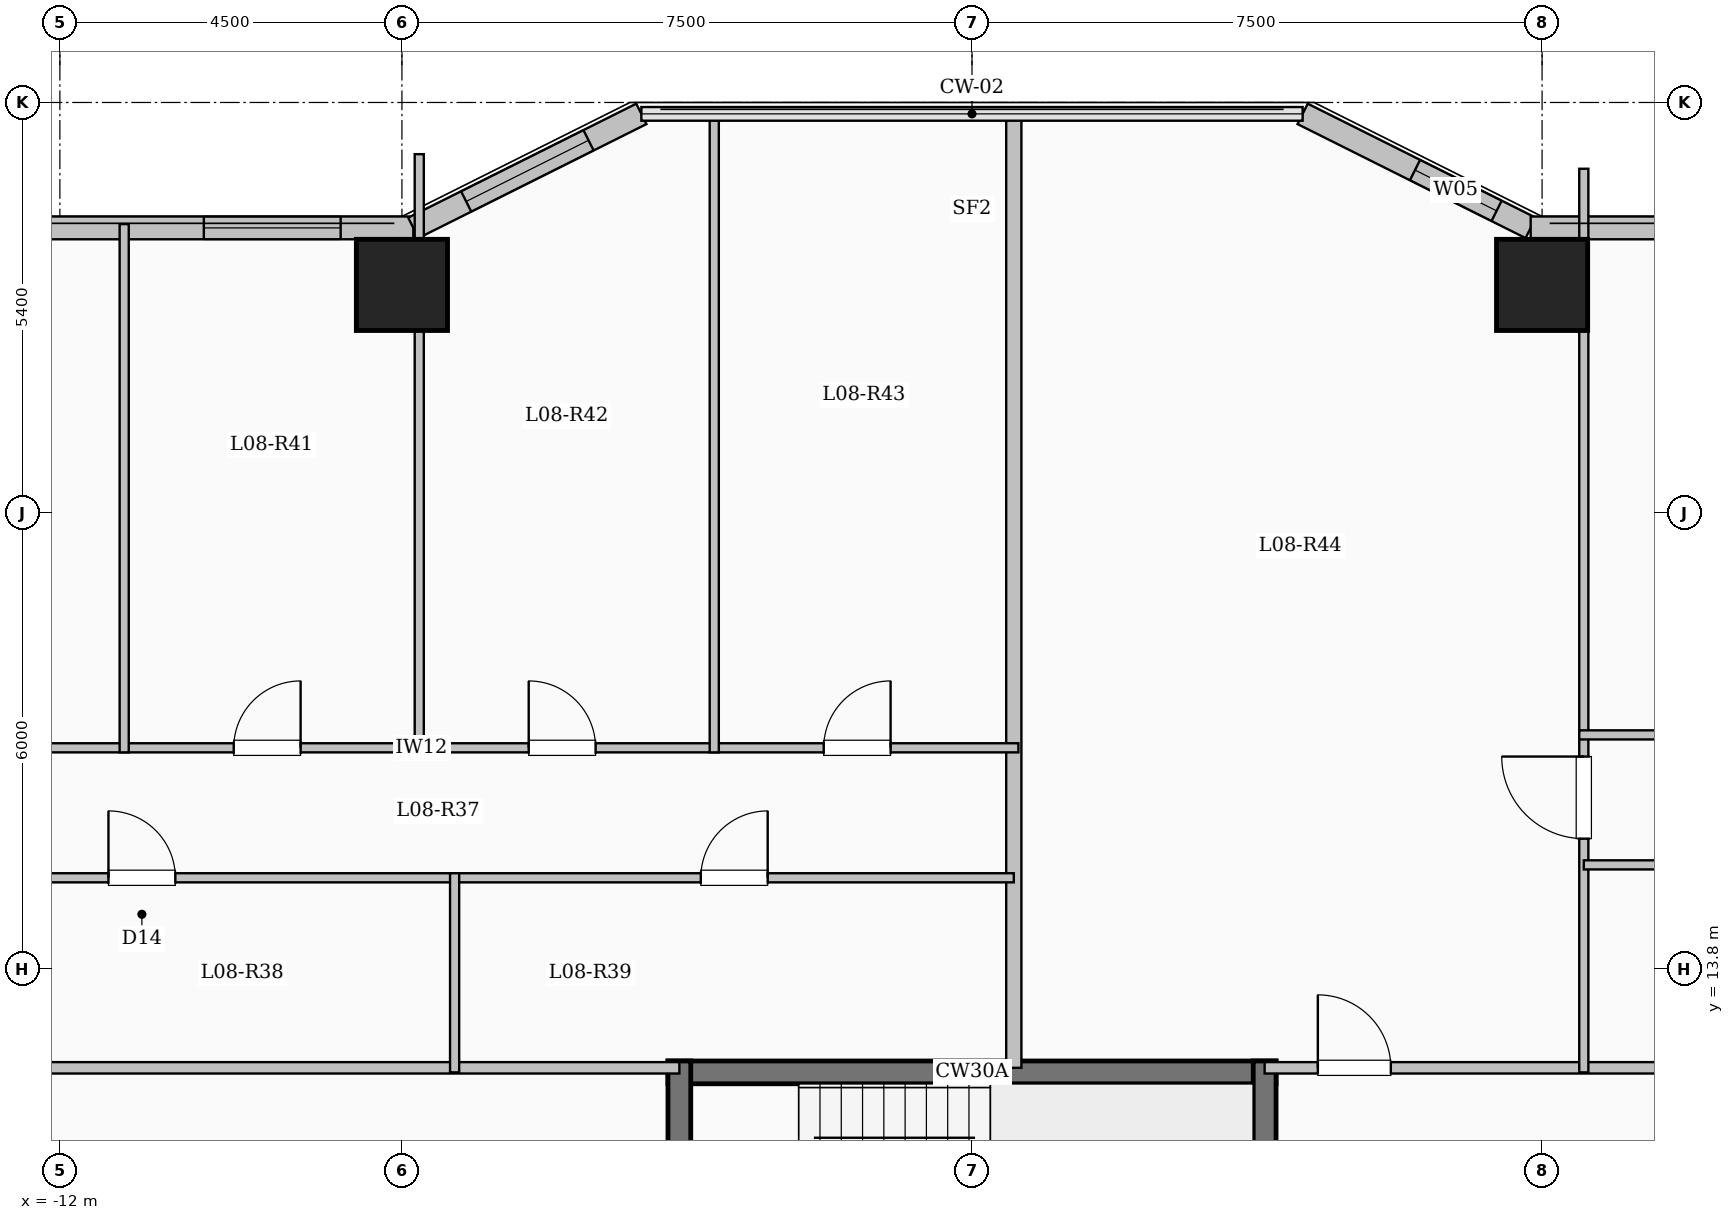
"""IFC4 building model, lengths in metres.
Left out: names, types, materials, properties, quantities, classifications, styles, units other than length and angle.
Written with IfcOpenShell. Run it as: python <this file> out.ifc"""

import sys

from ifc_helpers import new_model, si_unit, direction, frame, frame_2d, origin, origin_2d, place, context, subcontext, project, spatial, rectangle, extrude, element, fill, save


model = new_model("IFC4")
c1 = context("Model", 3, precision=1e-05, world=origin(), true_north=direction((0.0, 1.0)))
c2 = subcontext(c1, "Body", "Model", "MODEL_VIEW")
j1 = project(units=[si_unit("LENGTHUNIT", "METRE"), si_unit("PLANEANGLEUNIT", "RADIAN")], contexts=[c1])
p1 = place(None, origin())
s1 = spatial("IfcSite", under=j1, at=p1, CompositionType="ELEMENT")
p2 = place(p1, origin())
s2 = spatial("IfcBuilding", under=s1, at=p2, CompositionType="ELEMENT")
p3 = place(p2, frame((0.0, 0.0, 34.05)))
s3 = spatial("IfcBuildingStorey", under=s2, at=p3, CompositionType="ELEMENT", Elevation=34.05)
for number, where, z_axis, x_axis in (
    (1, (-7.5, 22.8, 0.0), (0.0, 0.0, 1.0), (1.0, 0.0, 0.0)),
    (2, (7.5, 22.8, 0.0), (0.0, 0.0, 1.0), (1.0, 0.0, 0.0)),
):
    element("IfcColumn", number, at=place(p3, frame(where, z_axis=z_axis, x_axis=x_axis)), inside=s3, PredefinedType="COLUMN", context=c2, shape_type="SweptSolid", body=[
        extrude(rectangle(XDim=1.2, YDim=1.2, at=origin_2d()), origin(), (0.0, 0.0, 1.0), 3.35),
    ])
p4 = place(p3, frame((-22.65, 23.55, 0.0), z_axis=(0.0, 0.0, 1.0), x_axis=(1.0, 0.0, 0.0)))
e3 = element("IfcWall", 3, at=p4, inside=s3, PredefinedType="SOLIDWALL", context=c2, shape_type="SweptSolid", body=[
    extrude(rectangle(XDim=15.3, YDim=0.3, at=frame_2d((7.65, 0.0))), origin(), (0.0, 0.0, 1.0), 3.1),
])
p5 = place(p4, frame((2.637, 0.0, 0.9)))
e4 = element("IfcOpeningElement", 4, at=p5, cuts=e3, PredefinedType="OPENING", context=c2, shape_type="SweptSolid", body=[
    extrude(rectangle(XDim=2.4, YDim=1.8, at=frame_2d((1.2, 0.9))), frame((0.0, 0.16, 0.0), z_axis=(0.0, -1.0, 0.0), x_axis=(1.0, 0.0, 0.0)), (0.0, 0.0, 1.0), 0.32),
])
p6 = place(p4, frame((8.656, 0.0, 0.9)))
e5 = element("IfcOpeningElement", 5, at=p6, cuts=e3, PredefinedType="OPENING", context=c2, shape_type="SweptSolid", body=[
    extrude(rectangle(XDim=1.8, YDim=1.65, at=frame_2d((0.9, 0.825))), frame((0.0, 0.16, 0.0), z_axis=(0.0, -1.0, 0.0), x_axis=(1.0, 0.0, 0.0)), (0.0, 0.0, 1.0), 0.32),
])
p7 = place(p4, frame((12.544, 0.0, 0.9)))
e6 = element("IfcOpeningElement", 6, at=p7, cuts=e3, PredefinedType="OPENING", context=c2, shape_type="SweptSolid", body=[
    extrude(rectangle(XDim=1.8, YDim=1.65, at=frame_2d((0.9, 0.825))), frame((0.0, 0.16, 0.0), z_axis=(0.0, -1.0, 0.0), x_axis=(1.0, 0.0, 0.0)), (0.0, 0.0, 1.0), 0.32),
])
p8 = place(p3, frame((-7.35, 23.55, 0.0), z_axis=(0.0, 0.0, 1.0), x_axis=(0.894427191, 0.4472135955, 0.0)))
e7 = element("IfcWall", 7, at=p8, inside=s3, PredefinedType="SOLIDWALL", context=c2, shape_type="SweptSolid", body=[
    extrude(rectangle(XDim=3.354, YDim=0.3, at=frame_2d((1.677, 0.0))), origin(), (0.0, 0.0, 1.0), 3.1),
])
p9 = place(p8, frame((0.777, 0.0, 0.9)))
e8 = element("IfcOpeningElement", 8, at=p9, cuts=e7, PredefinedType="OPENING", context=c2, shape_type="SweptSolid", body=[
    extrude(rectangle(XDim=1.8, YDim=1.65, at=frame_2d((0.9, 0.825))), frame((0.0, 0.16, 0.0), z_axis=(0.0, -1.0, 0.0), x_axis=(1.0, 0.0, 0.0)), (0.0, 0.0, 1.0), 0.32),
])
p10 = place(p3, frame((4.35, 25.05, 0.0), z_axis=(0.0, 0.0, 1.0), x_axis=(0.894427191, -0.4472135955, 0.0)))
e9 = element("IfcWall", 9, at=p10, inside=s3, PredefinedType="SOLIDWALL", context=c2, shape_type="SweptSolid", body=[
    extrude(rectangle(XDim=3.354, YDim=0.3, at=frame_2d((1.677, 0.0))), origin(), (0.0, 0.0, 1.0), 3.1),
])
p11 = place(p10, frame((1.653, 0.0, 0.95)))
e10 = element("IfcOpeningElement", 10, at=p11, cuts=e9, PredefinedType="OPENING", context=c2, shape_type="SweptSolid", body=[
    extrude(rectangle(XDim=1.2, YDim=1.5, at=frame_2d((0.6, 0.75))), frame((0.0, 0.16, 0.0), z_axis=(0.0, -1.0, 0.0), x_axis=(1.0, 0.0, 0.0)), (0.0, 0.0, 1.0), 0.32),
])
p12 = place(p3, frame((7.35, 23.55, 0.0), z_axis=(0.0, 0.0, 1.0), x_axis=(1.0, 0.0, 0.0)))
e11 = element("IfcWall", 11, at=p12, inside=s3, PredefinedType="SOLIDWALL", context=c2, shape_type="SweptSolid", body=[
    extrude(rectangle(XDim=15.3, YDim=0.3, at=frame_2d((7.65, 0.0))), origin(), (0.0, 0.0, 1.0), 3.1),
])
p13 = place(p12, frame((2.185, 0.0, 0.9)))
e12 = element("IfcOpeningElement", 12, at=p13, cuts=e11, PredefinedType="OPENING", context=c2, shape_type="SweptSolid", body=[
    extrude(rectangle(XDim=1.8, YDim=1.65, at=frame_2d((0.9, 0.825))), frame((0.0, 0.16, 0.0), z_axis=(0.0, -1.0, 0.0), x_axis=(1.0, 0.0, 0.0)), (0.0, 0.0, 1.0), 0.32),
])
p14 = place(p12, frame((7.001, 0.0, 0.9)))
e13 = element("IfcOpeningElement", 13, at=p14, cuts=e11, PredefinedType="OPENING", context=c2, shape_type="SweptSolid", body=[
    extrude(rectangle(XDim=1.8, YDim=1.65, at=frame_2d((0.9, 0.825))), frame((0.0, 0.16, 0.0), z_axis=(0.0, -1.0, 0.0), x_axis=(1.0, 0.0, 0.0)), (0.0, 0.0, 1.0), 0.32),
])
p15 = place(p12, frame((11.867, 0.0, 0.9)))
e14 = element("IfcOpeningElement", 14, at=p15, cuts=e11, PredefinedType="OPENING", context=c2, shape_type="SweptSolid", body=[
    extrude(rectangle(XDim=1.8, YDim=1.65, at=frame_2d((0.9, 0.825))), frame((0.0, 0.16, 0.0), z_axis=(0.0, -1.0, 0.0), x_axis=(1.0, 0.0, 0.0)), (0.0, 0.0, 1.0), 0.32),
])
p16 = place(p3, frame((-4.0, 12.44, 0.0), z_axis=(0.0, 0.0, 1.0), x_axis=(1.0, 0.0, 0.0)))
e15 = element("IfcWall", 15, at=p16, inside=s3, PredefinedType="SHEAR", context=c2, shape_type="SweptSolid", body=[
    extrude(rectangle(XDim=8.0, YDim=0.3, at=frame_2d((4.0, 0.0))), origin(), (0.0, 0.0, 1.0), 3.35),
])
for number, where, z_axis, x_axis in (
    (16, (-3.85, 9.0, 0.0), (0.0, 0.0, 1.0), (0.0, 1.0, 0.0)),
    (17, (3.85, 9.0, 0.0), (0.0, 0.0, 1.0), (0.0, 1.0, 0.0)),
):
    element("IfcWall", number, at=place(p3, frame(where, z_axis=z_axis, x_axis=x_axis)), inside=s3, PredefinedType="SHEAR", context=c2, shape_type="SweptSolid", body=[
        extrude(rectangle(XDim=3.59, YDim=0.3, at=frame_2d((1.795, 0.0))), origin(), (0.0, 0.0, 1.0), 3.35),
    ])
p17 = place(p3, frame((-22.55, 12.5, 0.0), z_axis=(0.0, 0.0, 1.0), x_axis=(1.0, 0.0, 0.0)))
e18 = element("IfcWall", 18, at=p17, inside=s3, PredefinedType="PARTITIONING", context=c2, shape_type="SweptSolid", body=[
    extrude(rectangle(XDim=18.7, YDim=0.15, at=frame_2d((9.35, 0.0))), origin(), (0.0, 0.0, 1.0), 3.1),
])
p18 = place(p17, frame((0.7, 0.0, 0.0)))
e19 = element("IfcOpeningElement", 19, at=p18, cuts=e18, PredefinedType="OPENING", context=c2, shape_type="SweptSolid", body=[
    extrude(rectangle(XDim=0.96, YDim=2.15, at=frame_2d((0.48, 1.075))), frame((0.0, 0.085, 0.0), z_axis=(0.0, -1.0, 0.0), x_axis=(1.0, 0.0, 0.0)), (0.0, 0.0, 1.0), 0.17),
])
p19 = place(p3, frame((3.85, 12.5, 0.0), z_axis=(0.0, 0.0, 1.0), x_axis=(1.0, 0.0, 0.0)))
e20 = element("IfcWall", 20, at=p19, inside=s3, PredefinedType="PARTITIONING", context=c2, shape_type="SweptSolid", body=[
    extrude(rectangle(XDim=18.7, YDim=0.15, at=frame_2d((9.35, 0.0))), origin(), (0.0, 0.0, 1.0), 3.1),
])
p20 = place(p19, frame((0.7, 0.0, 0.0)))
e21 = element("IfcOpeningElement", 21, at=p20, cuts=e20, PredefinedType="OPENING", context=c2, shape_type="SweptSolid", body=[
    extrude(rectangle(XDim=0.96, YDim=2.15, at=frame_2d((0.48, 1.075))), frame((0.0, 0.085, 0.0), z_axis=(0.0, -1.0, 0.0), x_axis=(1.0, 0.0, 0.0)), (0.0, 0.0, 1.0), 0.17),
])
p21 = place(p3, frame((0.55, 12.5, 0.0), z_axis=(0.0, 0.0, 1.0), x_axis=(0.0, 1.0, 0.0)))
e22 = element("IfcWall", 22, at=p21, inside=s3, PredefinedType="SOLIDWALL", context=c2, shape_type="SweptSolid", body=[
    extrude(rectangle(XDim=12.58, YDim=0.2, at=frame_2d((6.29, 0.0))), origin(), (0.0, 0.0, 1.0), 3.1),
])
p22 = place(p3, frame((-15.035, 15.0, 0.0), z_axis=(0.0, 0.0, 1.0), x_axis=(1.0, 0.0, 0.0)))
e23 = element("IfcWall", 23, at=p22, inside=s3, PredefinedType="PARTITIONING", context=c2, shape_type="SweptSolid", body=[
    extrude(rectangle(XDim=8.228, YDim=0.12, at=frame_2d((4.114, 0.0))), origin(), (0.0, 0.0, 1.0), 2.585),
])
p23 = place(p22, frame((3.674, 0.0, 0.0)))
e24 = element("IfcOpeningElement", 24, at=p23, cuts=e23, PredefinedType="OPENING", context=c2, shape_type="SweptSolid", body=[
    extrude(rectangle(XDim=0.88, YDim=2.1, at=frame_2d((0.44, 1.05))), frame((0.0, 0.07, 0.0), z_axis=(0.0, -1.0, 0.0), x_axis=(1.0, 0.0, 0.0)), (0.0, 0.0, 1.0), 0.14),
])
p24 = place(p3, frame((-6.807, 15.0, 0.0), z_axis=(0.0, 0.0, 1.0), x_axis=(1.0, 0.0, 0.0)))
e25 = element("IfcWall", 25, at=p24, inside=s3, PredefinedType="PARTITIONING", context=c2, shape_type="SweptSolid", body=[
    extrude(rectangle(XDim=7.357, YDim=0.12, at=frame_2d((3.678, 0.0))), origin(), (0.0, 0.0, 1.0), 2.585),
])
p25 = place(p24, frame((3.239, 0.0, 0.0)))
e26 = element("IfcOpeningElement", 26, at=p25, cuts=e25, PredefinedType="OPENING", context=c2, shape_type="SweptSolid", body=[
    extrude(rectangle(XDim=0.88, YDim=2.1, at=frame_2d((0.44, 1.05))), frame((0.0, 0.07, 0.0), z_axis=(0.0, -1.0, 0.0), x_axis=(1.0, 0.0, 0.0)), (0.0, 0.0, 1.0), 0.14),
])
p26 = place(p3, frame((-15.095, 16.71, 0.0), z_axis=(0.0, 0.0, 1.0), x_axis=(1.0, 0.0, 0.0)))
e27 = element("IfcWall", 27, at=p26, inside=s3, PredefinedType="PARTITIONING", context=c2, shape_type="SweptSolid", body=[
    extrude(rectangle(XDim=15.705, YDim=0.12, at=frame_2d((7.853, 0.0))), origin(), (0.0, 0.0, 1.0), 2.585),
])
p27 = place(p26, frame((1.501, 0.0, 0.0)))
e28 = element("IfcOpeningElement", 28, at=p27, cuts=e27, PredefinedType="OPENING", context=c2, shape_type="SweptSolid", body=[
    extrude(rectangle(XDim=0.88, YDim=2.1, at=frame_2d((0.44, 1.05))), frame((0.0, 0.07, 0.0), z_axis=(0.0, -1.0, 0.0), x_axis=(1.0, 0.0, 0.0)), (0.0, 0.0, 1.0), 0.14),
])
p28 = place(p26, frame((5.382, 0.0, 0.0)))
e29 = element("IfcOpeningElement", 29, at=p28, cuts=e27, PredefinedType="OPENING", context=c2, shape_type="SweptSolid", body=[
    extrude(rectangle(XDim=0.88, YDim=2.1, at=frame_2d((0.44, 1.05))), frame((0.0, 0.07, 0.0), z_axis=(0.0, -1.0, 0.0), x_axis=(1.0, 0.0, 0.0)), (0.0, 0.0, 1.0), 0.14),
])
p29 = place(p26, frame((9.263, 0.0, 0.0)))
e30 = element("IfcOpeningElement", 30, at=p29, cuts=e27, PredefinedType="OPENING", context=c2, shape_type="SweptSolid", body=[
    extrude(rectangle(XDim=0.88, YDim=2.1, at=frame_2d((0.44, 1.05))), frame((0.0, 0.07, 0.0), z_axis=(0.0, -1.0, 0.0), x_axis=(1.0, 0.0, 0.0)), (0.0, 0.0, 1.0), 0.14),
])
p30 = place(p26, frame((13.144, 0.0, 0.0)))
e31 = element("IfcOpeningElement", 31, at=p30, cuts=e27, PredefinedType="OPENING", context=c2, shape_type="SweptSolid", body=[
    extrude(rectangle(XDim=0.88, YDim=2.1, at=frame_2d((0.44, 1.05))), frame((0.0, 0.07, 0.0), z_axis=(0.0, -1.0, 0.0), x_axis=(1.0, 0.0, 0.0)), (0.0, 0.0, 1.0), 0.14),
])
p31 = place(p3, frame((-6.807, 12.44, 0.0), z_axis=(0.0, 0.0, 1.0), x_axis=(0.0, 1.0, 0.0)))
e32 = element("IfcWall", 32, at=p31, inside=s3, PredefinedType="PARTITIONING", context=c2, shape_type="SweptSolid", body=[
    extrude(rectangle(XDim=2.62, YDim=0.12, at=frame_2d((1.31, 0.0))), origin(), (0.0, 0.0, 1.0), 3.1),
])
p32 = place(p3, frame((-11.154, 16.65, 0.0), z_axis=(0.0, 0.0, 1.0), x_axis=(0.0, 1.0, 0.0)))
e33 = element("IfcWall", 33, at=p32, inside=s3, PredefinedType="PARTITIONING", context=c2, shape_type="SweptSolid", body=[
    extrude(rectangle(XDim=6.95, YDim=0.12, at=frame_2d((3.475, 0.0))), origin(), (0.0, 0.0, 1.0), 3.1),
])
p33 = place(p3, frame((-7.272, 16.65, 0.0), z_axis=(0.0, 0.0, 1.0), x_axis=(0.0, 1.0, 0.0)))
e34 = element("IfcWall", 34, at=p33, inside=s3, PredefinedType="PARTITIONING", context=c2, shape_type="SweptSolid", body=[
    extrude(rectangle(XDim=7.87, YDim=0.12, at=frame_2d((3.935, 0.0))), origin(), (0.0, 0.0, 1.0), 2.435),
])
p34 = place(p3, frame((-3.391, 16.65, 0.0), z_axis=(0.0, 0.0, 1.0), x_axis=(0.0, 1.0, 0.0)))
e35 = element("IfcWall", 35, at=p34, inside=s3, PredefinedType="PARTITIONING", context=c2, shape_type="SweptSolid", body=[
    extrude(rectangle(XDim=8.43, YDim=0.12, at=frame_2d((4.215, 0.0))), origin(), (0.0, 0.0, 1.0), 3.1),
])
p35 = place(p3, frame((8.049, 12.44, 0.0), z_axis=(0.0, 0.0, 1.0), x_axis=(0.0, 1.0, 0.0)))
e36 = element("IfcWall", 36, at=p35, inside=s3, PredefinedType="PARTITIONING", context=c2, shape_type="SweptSolid", body=[
    extrude(rectangle(XDim=11.888, YDim=0.12, at=frame_2d((5.944, 0.0))), origin(), (0.0, 0.0, 1.0), 2.435),
])
p36 = place(p35, frame((3.075, 0.0, 0.0)))
e37 = element("IfcOpeningElement", 37, at=p36, cuts=e36, PredefinedType="OPENING", context=c2, shape_type="SweptSolid", body=[
    extrude(rectangle(XDim=1.08, YDim=2.15, at=frame_2d((0.54, 1.075))), frame((0.0, 0.07, 0.0), z_axis=(0.0, -1.0, 0.0), x_axis=(1.0, 0.0, 0.0)), (0.0, 0.0, 1.0), 0.14),
])
p37 = place(p3, frame((8.049, 15.17, 0.0), z_axis=(0.0, 0.0, 1.0), x_axis=(1.0, 0.0, 0.0)))
e38 = element("IfcWall", 38, at=p37, inside=s3, PredefinedType="PARTITIONING", context=c2, shape_type="SweptSolid", body=[
    extrude(rectangle(XDim=8.231, YDim=0.12, at=frame_2d((4.115, 0.0))), origin(), (0.0, 0.0, 1.0), 3.1),
])
p38 = place(p37, frame((3.676, 0.0, 0.0)))
e39 = element("IfcOpeningElement", 39, at=p38, cuts=e38, PredefinedType="OPENING", context=c2, shape_type="SweptSolid", body=[
    extrude(rectangle(XDim=0.88, YDim=2.1, at=frame_2d((0.44, 1.05))), frame((0.0, 0.07, 0.0), z_axis=(0.0, -1.0, 0.0), x_axis=(1.0, 0.0, 0.0)), (0.0, 0.0, 1.0), 0.14),
])
p39 = place(p3, frame((7.989, 16.88, 0.0), z_axis=(0.0, 0.0, 1.0), x_axis=(1.0, 0.0, 0.0)))
e40 = element("IfcWall", 40, at=p39, inside=s3, PredefinedType="PARTITIONING", context=c2, shape_type="SweptSolid", body=[
    extrude(rectangle(XDim=14.621, YDim=0.12, at=frame_2d((7.311, 0.0))), origin(), (0.0, 0.0, 1.0), 3.1),
])
p40 = place(p39, frame((1.967, 0.0, 0.0)))
e41 = element("IfcOpeningElement", 41, at=p40, cuts=e40, PredefinedType="OPENING", context=c2, shape_type="SweptSolid", body=[
    extrude(rectangle(XDim=0.88, YDim=2.1, at=frame_2d((0.44, 1.05))), frame((0.0, 0.07, 0.0), z_axis=(0.0, -1.0, 0.0), x_axis=(1.0, 0.0, 0.0)), (0.0, 0.0, 1.0), 0.14),
])
p41 = place(p39, frame((6.781, 0.0, 0.0)))
e42 = element("IfcOpeningElement", 42, at=p41, cuts=e40, PredefinedType="OPENING", context=c2, shape_type="SweptSolid", body=[
    extrude(rectangle(XDim=0.88, YDim=2.1, at=frame_2d((0.44, 1.05))), frame((0.0, 0.07, 0.0), z_axis=(0.0, -1.0, 0.0), x_axis=(1.0, 0.0, 0.0)), (0.0, 0.0, 1.0), 0.14),
])
p42 = place(p39, frame((11.594, 0.0, 0.0)))
e43 = element("IfcOpeningElement", 43, at=p42, cuts=e40, PredefinedType="OPENING", context=c2, shape_type="SweptSolid", body=[
    extrude(rectangle(XDim=0.88, YDim=2.1, at=frame_2d((0.44, 1.05))), frame((0.0, 0.07, 0.0), z_axis=(0.0, -1.0, 0.0), x_axis=(1.0, 0.0, 0.0)), (0.0, 0.0, 1.0), 0.14),
])
p43 = place(p7, origin())
e44 = element("IfcWindow", 44, at=p43, inside=s3, PartitioningType="SINGLE_PANEL", PredefinedType="WINDOW", context=c2, shape_type="SweptSolid", body=[
    extrude(rectangle(XDim=1.8, YDim=1.65, at=frame_2d((0.9, 0.825))), frame((0.0, 0.03, 0.0), z_axis=(0.0, -1.0, 0.0), x_axis=(1.0, 0.0, 0.0)), (0.0, 0.0, 1.0), 0.06),
])
fill(e6, e44)
p44 = place(p9, origin())
e45 = element("IfcWindow", 45, at=p44, inside=s3, PartitioningType="SINGLE_PANEL", PredefinedType="WINDOW", context=c2, shape_type="SweptSolid", body=[
    extrude(rectangle(XDim=1.8, YDim=1.65, at=frame_2d((0.9, 0.825))), frame((0.0, 0.03, 0.0), z_axis=(0.0, -1.0, 0.0), x_axis=(1.0, 0.0, 0.0)), (0.0, 0.0, 1.0), 0.06),
])
fill(e8, e45)
p45 = place(p11, origin())
e46 = element("IfcWindow", 46, at=p45, inside=s3, PartitioningType="SINGLE_PANEL", PredefinedType="WINDOW", context=c2, shape_type="SweptSolid", body=[
    extrude(rectangle(XDim=1.2, YDim=1.5, at=frame_2d((0.6, 0.75))), frame((0.0, 0.03, 0.0), z_axis=(0.0, -1.0, 0.0), x_axis=(1.0, 0.0, 0.0)), (0.0, 0.0, 1.0), 0.06),
])
fill(e10, e46)
p46 = place(p23, origin())
e47 = element("IfcDoor", 47, at=p46, inside=s3, OperationType="SINGLE_SWING_LEFT", PredefinedType="DOOR", context=c2, shape_type="SweptSolid", body=[
    extrude(rectangle(XDim=0.88, YDim=2.1, at=frame_2d((0.44, 1.05))), frame((0.0, 0.025, 0.0), z_axis=(0.0, -1.0, 0.0), x_axis=(1.0, 0.0, 0.0)), (0.0, 0.0, 1.0), 0.05),
])
fill(e24, e47)
p47 = place(p25, origin())
e48 = element("IfcDoor", 48, at=p47, inside=s3, OperationType="SINGLE_SWING_RIGHT", PredefinedType="DOOR", context=c2, shape_type="SweptSolid", body=[
    extrude(rectangle(XDim=0.88, YDim=2.1, at=frame_2d((0.44, 1.05))), frame((0.0, 0.025, 0.0), z_axis=(0.0, -1.0, 0.0), x_axis=(1.0, 0.0, 0.0)), (0.0, 0.0, 1.0), 0.05),
])
fill(e26, e48)
p48 = place(p28, origin())
e49 = element("IfcDoor", 49, at=p48, inside=s3, OperationType="SINGLE_SWING_RIGHT", PredefinedType="DOOR", context=c2, shape_type="SweptSolid", body=[
    extrude(rectangle(XDim=0.88, YDim=2.1, at=frame_2d((0.44, 1.05))), frame((0.0, 0.025, 0.0), z_axis=(0.0, -1.0, 0.0), x_axis=(1.0, 0.0, 0.0)), (0.0, 0.0, 1.0), 0.05),
])
fill(e29, e49)
p49 = place(p29, origin())
e50 = element("IfcDoor", 50, at=p49, inside=s3, OperationType="SINGLE_SWING_LEFT", PredefinedType="DOOR", context=c2, shape_type="SweptSolid", body=[
    extrude(rectangle(XDim=0.88, YDim=2.1, at=frame_2d((0.44, 1.05))), frame((0.0, 0.025, 0.0), z_axis=(0.0, -1.0, 0.0), x_axis=(1.0, 0.0, 0.0)), (0.0, 0.0, 1.0), 0.05),
])
fill(e30, e50)
p50 = place(p30, origin())
e51 = element("IfcDoor", 51, at=p50, inside=s3, OperationType="SINGLE_SWING_RIGHT", PredefinedType="DOOR", context=c2, shape_type="SweptSolid", body=[
    extrude(rectangle(XDim=0.88, YDim=2.1, at=frame_2d((0.44, 1.05))), frame((0.0, 0.025, 0.0), z_axis=(0.0, -1.0, 0.0), x_axis=(1.0, 0.0, 0.0)), (0.0, 0.0, 1.0), 0.05),
])
fill(e31, e51)
p51 = place(p20, origin())
e52 = element("IfcDoor", 52, at=p51, inside=s3, OperationType="SINGLE_SWING_LEFT", PredefinedType="DOOR", context=c2, shape_type="SweptSolid", body=[
    extrude(rectangle(XDim=0.96, YDim=2.15, at=frame_2d((0.48, 1.075))), frame((0.0, 0.025, 0.0), z_axis=(0.0, -1.0, 0.0), x_axis=(1.0, 0.0, 0.0)), (0.0, 0.0, 1.0), 0.05),
])
fill(e21, e52)
p52 = place(p36, origin())
e53 = element("IfcDoor", 53, at=p52, inside=s3, OperationType="SINGLE_SWING_RIGHT", PredefinedType="DOOR", context=c2, shape_type="SweptSolid", body=[
    extrude(rectangle(XDim=1.08, YDim=2.15, at=frame_2d((0.54, 1.075))), frame((0.0, 0.025, 0.0), z_axis=(0.0, -1.0, 0.0), x_axis=(1.0, 0.0, 0.0)), (0.0, 0.0, 1.0), 0.05),
])
fill(e37, e53)
save(model, sys.argv[1])
